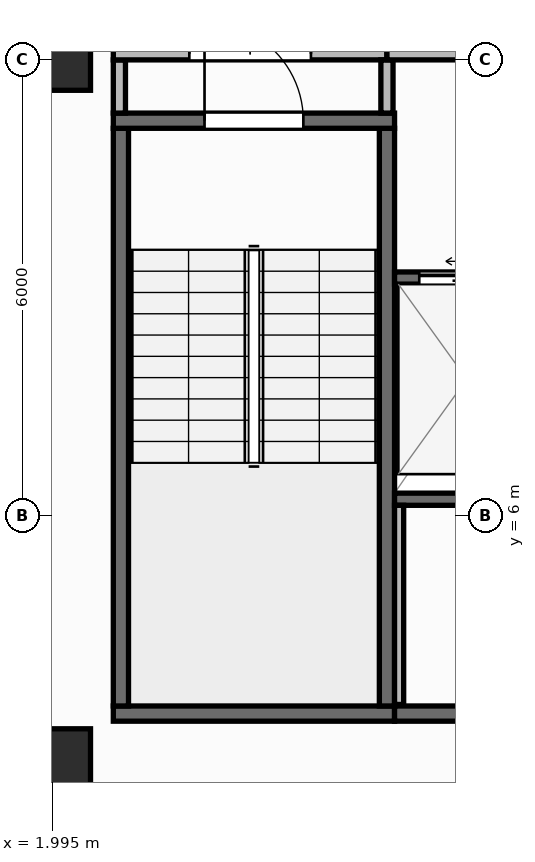
"""IFC4 building model, lengths in metres.
Left out: names, types, materials, properties, quantities, classifications, styles, units other than length and angle.
Written with IfcOpenShell. Run it as: python <this file> out.ifc"""

import sys

from ifc_helpers import new_model, si_unit, direction, frame, frame_2d, origin, origin_2d, place, context, subcontext, project, spatial, rectangle, extrude, element, fill, save


model = new_model("IFC4")
c1 = context("Model", 3, precision=1e-05, world=origin(), true_north=direction((0.0, 1.0)))
c2 = subcontext(c1, "Body", "Model", "MODEL_VIEW")
j1 = project(units=[si_unit("LENGTHUNIT", "METRE"), si_unit("PLANEANGLEUNIT", "RADIAN")], contexts=[c1])
p1 = place(None, origin())
s1 = spatial("IfcSite", under=j1, at=p1, CompositionType="ELEMENT")
p2 = place(p1, origin())
s2 = spatial("IfcBuilding", under=s1, at=p2, CompositionType="ELEMENT")
p3 = place(p2, frame((0.0, 0.0, 300.0)))
s3 = spatial("IfcBuildingStorey", under=s2, at=p3, CompositionType="ELEMENT", Elevation=300.0)
for number, where, z_axis, x_axis in (
    (1, (2.1, 2.8, 0.0), (0.0, 0.0, 1.0), (1.0, 0.0, 0.0)),
    (2, (2.1, 12.0, 0.0), (0.0, 0.0, 1.0), (1.0, 0.0, 0.0)),
):
    element("IfcColumn", number, at=place(p3, frame(where, z_axis=z_axis, x_axis=x_axis)), inside=s3, PredefinedType="COLUMN", context=c2, shape_type="SweptSolid", body=[
        extrude(rectangle(XDim=0.8, YDim=0.8, at=origin_2d()), origin(), (0.0, 0.0, 1.0), 3.95),
    ])
p4 = place(p3, frame((2.46, 0.171, 0.0), z_axis=(0.0, 0.0, 1.0), x_axis=(0.997760665813, 0.066885377746, 0.0)))
e3 = element("IfcWall", 3, at=p4, inside=s3, PredefinedType="STANDARD", context=c2, shape_type="SweptSolid", body=[
    extrude(rectangle(XDim=35.56, YDim=0.26, at=frame_2d((17.78, 0.0))), origin(), (0.0, 0.0, 1.0), 3.67),
])
p5 = place(p4, frame((16.58, 0.0, 0.9)))
e4 = element("IfcOpeningElement", 4, at=p5, cuts=e3, PredefinedType="OPENING", context=c2, shape_type="SweptSolid", body=[
    extrude(rectangle(XDim=2.4, YDim=1.65, at=frame_2d((1.2, 0.825))), frame((0.0, 0.14, 0.0), z_axis=(0.0, -1.0, 0.0), x_axis=(1.0, 0.0, 0.0)), (0.0, 0.0, 1.0), 0.28),
])
p6 = place(p3, frame((2.8, 3.4, 0.0), z_axis=(0.0, 0.0, 1.0), x_axis=(1.0, 0.0, 0.0)))
e5 = element("IfcWall", 5, at=p6, inside=s3, PredefinedType="SHEAR", context=c2, shape_type="SweptSolid", body=[
    extrude(rectangle(XDim=3.7, YDim=0.2, at=frame_2d((1.85, 0.0))), origin(), (0.0, 0.0, 1.0), 3.67),
])
for number, where, z_axis, x_axis in (
    (6, (2.9, 3.5, 0.0), (0.0, 0.0, 1.0), (0.0, 1.0, 0.0)),
    (7, (6.4, 3.5, 0.0), (0.0, 0.0, 1.0), (0.0, 1.0, 0.0)),
):
    element("IfcWall", number, at=place(p3, frame(where, z_axis=z_axis, x_axis=x_axis)), inside=s3, PredefinedType="SHEAR", context=c2, shape_type="SweptSolid", body=[
        extrude(rectangle(XDim=7.6, YDim=0.2, at=frame_2d((3.8, 0.0))), origin(), (0.0, 0.0, 1.0), 3.67),
    ])
p7 = place(p3, frame((2.8, 11.2, 0.0), z_axis=(0.0, 0.0, 1.0), x_axis=(1.0, 0.0, 0.0)))
e8 = element("IfcWall", 8, at=p7, inside=s3, PredefinedType="SHEAR", context=c2, shape_type="SweptSolid", body=[
    extrude(rectangle(XDim=3.7, YDim=0.2, at=frame_2d((1.85, 0.0))), origin(), (0.0, 0.0, 1.0), 3.67),
])
p8 = place(p7, frame((1.2, 0.0, 0.0)))
e9 = element("IfcOpeningElement", 9, at=p8, cuts=e8, PredefinedType="OPENING", context=c2, shape_type="SweptSolid", body=[
    extrude(rectangle(XDim=1.3, YDim=2.15, at=frame_2d((0.65, 1.075))), frame((0.0, 0.11, 0.0), z_axis=(0.0, -1.0, 0.0), x_axis=(1.0, 0.0, 0.0)), (0.0, 0.0, 1.0), 0.22),
])
p9 = place(p3, frame((6.5, 3.4, 0.0), z_axis=(0.0, 0.0, 1.0), x_axis=(1.0, 0.0, 0.0)))
e10 = element("IfcWall", 10, at=p9, inside=s3, PredefinedType="SHEAR", context=c2, shape_type="SweptSolid", body=[
    extrude(rectangle(XDim=13.7, YDim=0.2, at=frame_2d((6.85, 0.0))), origin(), (0.0, 0.0, 1.0), 3.67),
])
p10 = place(p3, frame((6.5, 6.22, 0.0), z_axis=(0.0, 0.0, 1.0), x_axis=(1.0, 0.0, 0.0)))
e11 = element("IfcWall", 11, at=p10, inside=s3, PredefinedType="SHEAR", context=c2, shape_type="SweptSolid", body=[
    extrude(rectangle(XDim=12.11, YDim=0.16, at=frame_2d((6.055, 0.0))), origin(), (0.0, 0.0, 1.0), 3.67),
])
p11 = place(p3, frame((6.5, 9.13, 0.0), z_axis=(0.0, 0.0, 1.0), x_axis=(1.0, 0.0, 0.0)))
e12 = element("IfcWall", 12, at=p11, inside=s3, PredefinedType="SHEAR", context=c2, shape_type="SweptSolid", body=[
    extrude(rectangle(XDim=1.975, YDim=0.16, at=frame_2d((0.988, 0.0))), origin(), (0.0, 0.0, 1.0), 3.67),
])
p12 = place(p11, frame((0.325, 0.0, 0.0)))
e13 = element("IfcOpeningElement", 13, at=p12, cuts=e12, PredefinedType="OPENING", context=c2, shape_type="SweptSolid", body=[
    extrude(rectangle(XDim=1.25, YDim=2.15, at=frame_2d((0.625, 1.075))), frame((0.0, 0.09, 0.0), z_axis=(0.0, -1.0, 0.0), x_axis=(1.0, 0.0, 0.0)), (0.0, 0.0, 1.0), 0.18),
])
p13 = place(p3, frame((6.56, 3.52, 0.0), z_axis=(0.0, 0.0, 1.0), x_axis=(0.0, 1.0, 0.0)))
e14 = element("IfcWall", 14, at=p13, inside=s3, PredefinedType="PARTITIONING", context=c2, shape_type="SweptSolid", body=[
    extrude(rectangle(XDim=2.62, YDim=0.12, at=frame_2d((1.31, 0.0))), origin(), (0.0, 0.0, 1.0), 3.67),
])
p14 = place(p3, frame((2.88, 11.3, 0.0), z_axis=(0.0, 0.0, 1.0), x_axis=(0.0, 1.0, 0.0)))
e15 = element("IfcWall", 15, at=p14, inside=s3, PredefinedType="PARTITIONING", context=c2, shape_type="SweptSolid", body=[
    extrude(rectangle(XDim=0.7, YDim=0.16, at=frame_2d((0.35, 0.0))), origin(), (0.0, 0.0, 1.0), 3.67),
])
p15 = place(p3, frame((2.8, 12.08, 0.0), z_axis=(0.0, 0.0, 1.0), x_axis=(1.0, 0.0, 0.0)))
e16 = element("IfcWall", 16, at=p15, inside=s3, PredefinedType="PARTITIONING", context=c2, shape_type="SweptSolid", body=[
    extrude(rectangle(XDim=3.6, YDim=0.16, at=frame_2d((1.8, 0.0))), origin(), (0.0, 0.0, 1.0), 3.117),
])
p16 = place(p15, frame((1.0, 0.0, 0.0)))
e17 = element("IfcOpeningElement", 17, at=p16, cuts=e16, PredefinedType="OPENING", context=c2, shape_type="SweptSolid", body=[
    extrude(rectangle(XDim=1.6, YDim=2.05, at=frame_2d((0.8, 1.025))), frame((0.0, 0.09, 0.0), z_axis=(0.0, -1.0, 0.0), x_axis=(1.0, 0.0, 0.0)), (0.0, 0.0, 1.0), 0.18),
])
p17 = place(p3, frame((6.4, 11.3, 0.0), z_axis=(0.0, 0.0, 1.0), x_axis=(0.0, 1.0, 0.0)))
e18 = element("IfcWall", 18, at=p17, inside=s3, PredefinedType="PARTITIONING", context=c2, shape_type="SweptSolid", body=[
    extrude(rectangle(XDim=0.7, YDim=0.16, at=frame_2d((0.35, 0.0))), origin(), (0.0, 0.0, 1.0), 3.67),
])
p18 = place(p3, frame((6.4, 12.08, 0.0), z_axis=(0.0, 0.0, 1.0), x_axis=(1.0, 0.0, 0.0)))
e19 = element("IfcWall", 19, at=p18, inside=s3, PredefinedType="PARTITIONING", context=c2, shape_type="SweptSolid", body=[
    extrude(rectangle(XDim=6.18, YDim=0.16, at=frame_2d((3.09, 0.0))), origin(), (0.0, 0.0, 1.0), 3.117),
])
p19 = place(p18, frame((2.29, 0.0, 0.0)))
e20 = element("IfcOpeningElement", 20, at=p19, cuts=e19, PredefinedType="OPENING", context=c2, shape_type="SweptSolid", body=[
    extrude(rectangle(XDim=1.6, YDim=2.05, at=frame_2d((0.8, 1.025))), frame((0.0, 0.09, 0.0), z_axis=(0.0, -1.0, 0.0), x_axis=(1.0, 0.0, 0.0)), (0.0, 0.0, 1.0), 0.18),
])
p20 = place(p8, origin())
e21 = element("IfcDoor", 21, at=p20, inside=s3, OperationType="SINGLE_SWING_LEFT", PredefinedType="DOOR", context=c2, shape_type="SweptSolid", body=[
    extrude(rectangle(XDim=1.3, YDim=2.15, at=frame_2d((0.65, 1.075))), frame((0.0, 0.025, 0.0), z_axis=(0.0, -1.0, 0.0), x_axis=(1.0, 0.0, 0.0)), (0.0, 0.0, 1.0), 0.05),
])
fill(e9, e21)
p21 = place(p12, origin())
e22 = element("IfcDoor", 22, at=p21, inside=s3, OperationType="SLIDING_TO_LEFT", PredefinedType="DOOR", context=c2, shape_type="SweptSolid", body=[
    extrude(rectangle(XDim=1.25, YDim=2.15, at=frame_2d((0.625, 1.075))), frame((0.0, 0.025, 0.0), z_axis=(0.0, -1.0, 0.0), x_axis=(1.0, 0.0, 0.0)), (0.0, 0.0, 1.0), 0.05),
])
fill(e13, e22)
p22 = place(p16, origin())
e23 = element("IfcDoor", 23, at=p22, inside=s3, OperationType="DOUBLE_DOOR_SINGLE_SWING", PredefinedType="DOOR", context=c2, shape_type="SweptSolid", body=[
    extrude(rectangle(XDim=1.6, YDim=2.05, at=frame_2d((0.8, 1.025))), frame((0.0, 0.025, 0.0), z_axis=(0.0, -1.0, 0.0), x_axis=(1.0, 0.0, 0.0)), (0.0, 0.0, 1.0), 0.05),
])
fill(e17, e23)
save(model, sys.argv[1])
